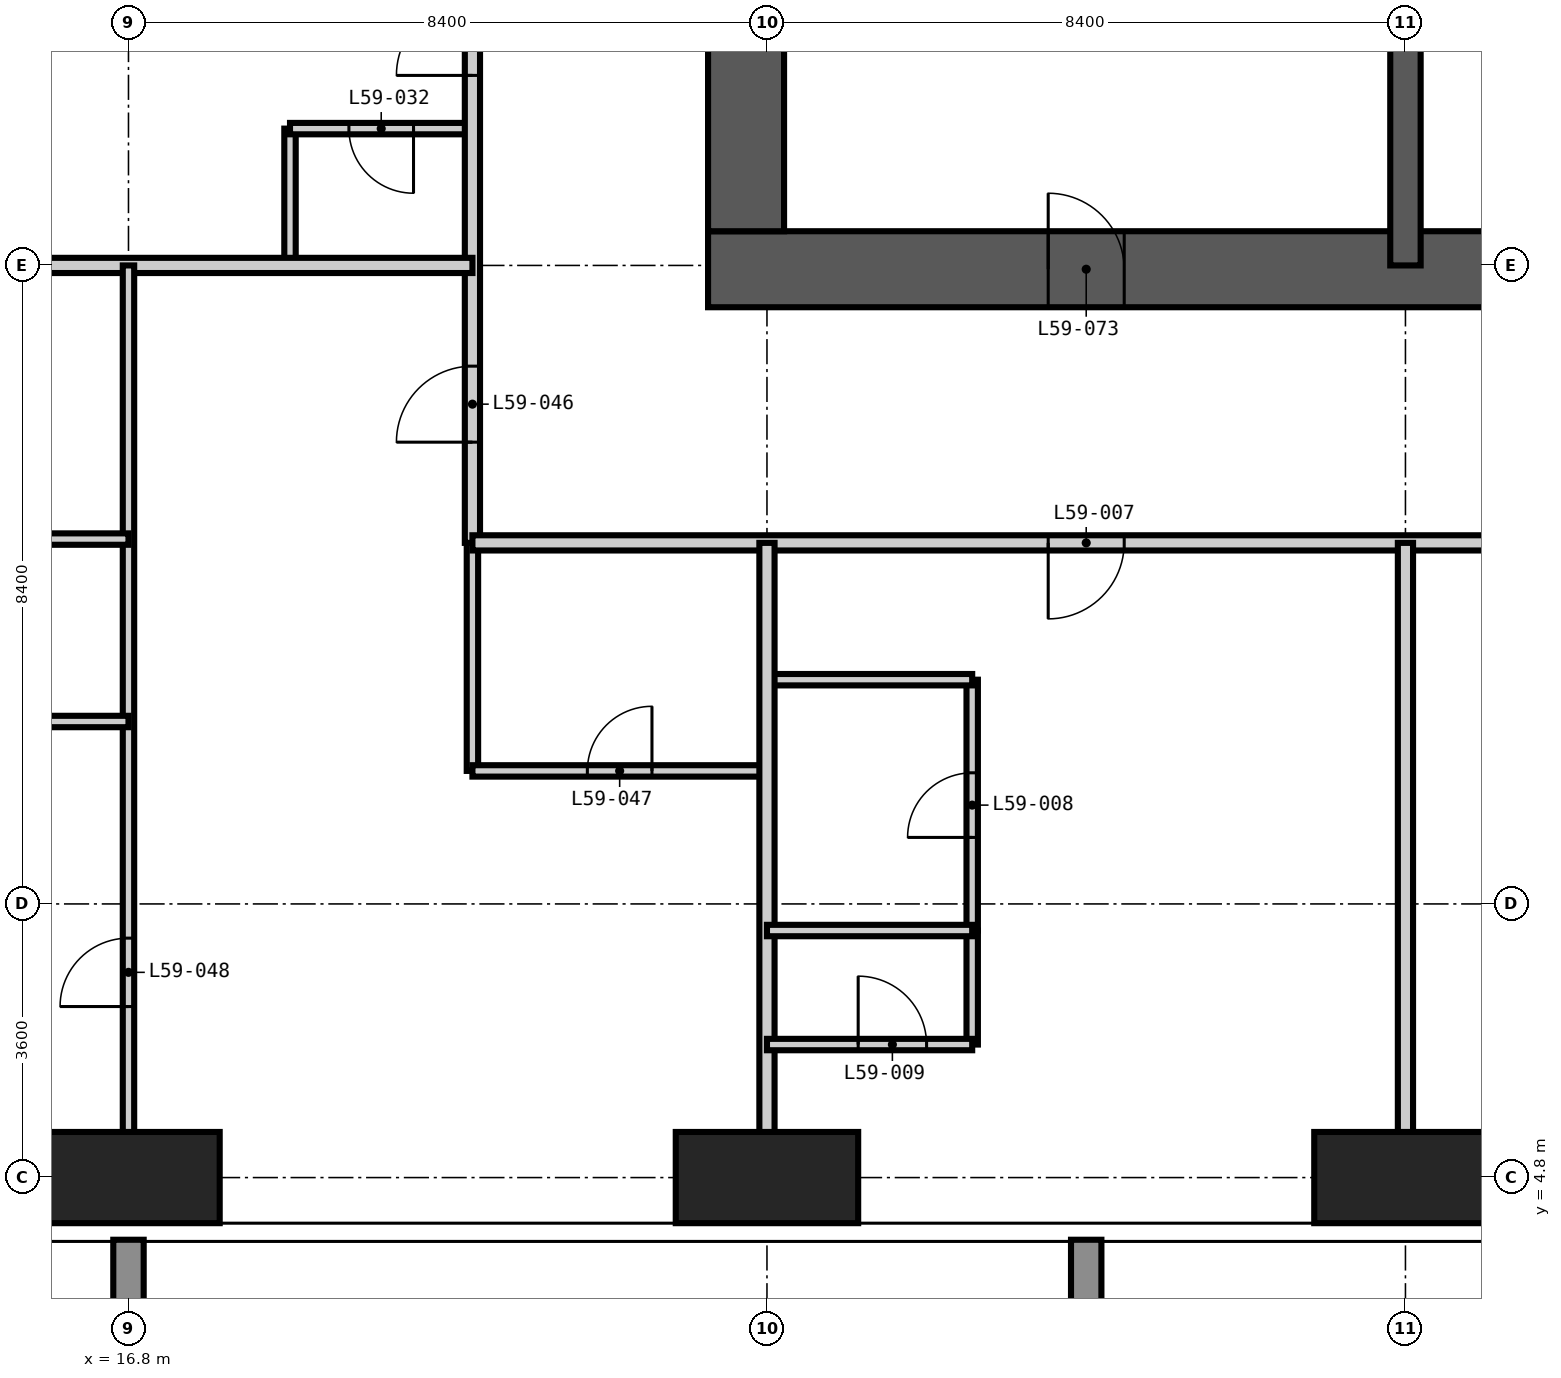
"""IFC4 building model, lengths in metres.
Left out: names, types, materials, properties, quantities, classifications, styles, units other than length and angle.
Written with IfcOpenShell. Run it as: python <this file> out.ifc"""

import sys

from ifc_helpers import new_model, si_unit, direction, frame, frame_2d, origin, origin_2d, place, context, subcontext, project, spatial, rectangle, extrude, element, fill, save


model = new_model("IFC4")
c1 = context("Model", 3, precision=1e-05, world=origin(), true_north=direction((0.0, 1.0)))
c2 = subcontext(c1, "Body", "Model", "MODEL_VIEW")
j1 = project(units=[si_unit("LENGTHUNIT", "METRE"), si_unit("PLANEANGLEUNIT", "RADIAN")], contexts=[c1])
p1 = place(None, origin())
s1 = spatial("IfcSite", under=j1, at=p1, CompositionType="ELEMENT")
p2 = place(p1, origin())
s2 = spatial("IfcBuilding", under=s1, at=p2, CompositionType="ELEMENT")
p3 = place(p2, frame((0.0, 0.0, 229.5)))
s3 = spatial("IfcBuildingStorey", under=s2, at=p3, CompositionType="ELEMENT", Elevation=229.5)
for number, where, z_axis, x_axis in (
    (1, (16.8, 4.8, -0.35), (0.0, 0.0, 1.0), (1.0, 0.0, 0.0)),
    (2, (25.2, 4.8, -0.35), (0.0, 0.0, 1.0), (1.0, 0.0, 0.0)),
    (3, (33.6, 4.8, -0.35), (0.0, 0.0, 1.0), (1.0, 0.0, 0.0)),
):
    element("IfcColumn", number, at=place(p3, frame(where, z_axis=z_axis, x_axis=x_axis)), inside=s3, PredefinedType="COLUMN", context=c2, shape_type="SweptSolid", body=[
        extrude(rectangle(XDim=2.4, YDim=1.2, at=origin_2d()), origin(), (0.0, 0.0, 1.0), 3.9),
    ])
p4 = place(p3, frame((24.425, 16.75, -0.35), z_axis=(0.0, 0.0, 1.0), x_axis=(1.0, 0.0, 0.0)))
e4 = element("IfcWall", 4, at=p4, inside=s3, PredefinedType="SHEAR", context=c2, shape_type="SweptSolid", body=[
    extrude(rectangle(XDim=18.125, YDim=1.0, at=frame_2d((9.062, 0.0))), origin(), (0.0, 0.0, 1.0), 3.9),
])
p5 = place(p4, frame((4.475, 0.0, 0.35)))
e5 = element("IfcOpeningElement", 5, at=p5, cuts=e4, PredefinedType="OPENING", context=c2, shape_type="SweptSolid", body=[
    extrude(rectangle(XDim=1.0, YDim=2.1, at=frame_2d((0.5, 1.05))), frame((0.0, 0.51, 0.0), z_axis=(0.0, -1.0, 0.0), x_axis=(1.0, 0.0, 0.0)), (0.0, 0.0, 1.0), 1.02),
])
p6 = place(p4, frame((10.775, 0.0, 0.35)))
e6 = element("IfcOpeningElement", 6, at=p6, cuts=e4, PredefinedType="OPENING", context=c2, shape_type="SweptSolid", body=[
    extrude(rectangle(XDim=1.0, YDim=2.1, at=frame_2d((0.5, 1.05))), frame((0.0, 0.51, 0.0), z_axis=(0.0, -1.0, 0.0), x_axis=(1.0, 0.0, 0.0)), (0.0, 0.0, 1.0), 1.02),
])
p7 = place(p3, frame((24.925, 41.55, -0.35), z_axis=(0.0, 0.0, 1.0), x_axis=(0.0, -1.0, 0.0)))
e7 = element("IfcWall", 7, at=p7, inside=s3, PredefinedType="SHEAR", context=c2, shape_type="SweptSolid", body=[
    extrude(rectangle(XDim=24.3, YDim=1.0, at=frame_2d((12.15, 0.0))), origin(), (0.0, 0.0, 1.0), 3.9),
])
p8 = place(p7, frame((11.65, 0.0, 0.35)))
e8 = element("IfcOpeningElement", 8, at=p8, cuts=e7, PredefinedType="OPENING", context=c2, shape_type="SweptSolid", body=[
    extrude(rectangle(XDim=1.0, YDim=2.1, at=frame_2d((0.5, 1.05))), frame((0.0, 0.51, 0.0), z_axis=(0.0, -1.0, 0.0), x_axis=(1.0, 0.0, 0.0)), (0.0, 0.0, 1.0), 1.02),
])
p9 = place(p3, frame((33.6, 16.8, -0.35), z_axis=(0.0, 0.0, 1.0), x_axis=(0.0, 1.0, 0.0)))
e9 = element("IfcWall", 9, at=p9, inside=s3, PredefinedType="SHEAR", context=c2, shape_type="SweptSolid", body=[
    extrude(rectangle(XDim=25.2, YDim=0.4, at=frame_2d((12.6, 0.0))), origin(), (0.0, 0.0, 1.0), 3.9),
])
p10 = place(p9, frame((22.5, 0.0, 0.35)))
e10 = element("IfcOpeningElement", 10, at=p10, cuts=e9, PredefinedType="OPENING", context=c2, shape_type="SweptSolid", body=[
    extrude(rectangle(XDim=1.2, YDim=2.2, at=frame_2d((0.6, 1.1))), frame((0.0, 0.21, 0.0), z_axis=(0.0, -1.0, 0.0), x_axis=(1.0, 0.0, 0.0)), (0.0, 0.0, 1.0), 0.42),
])
p11 = place(p9, frame((18.3, 0.0, 0.35)))
e11 = element("IfcOpeningElement", 11, at=p11, cuts=e9, PredefinedType="OPENING", context=c2, shape_type="SweptSolid", body=[
    extrude(rectangle(XDim=1.2, YDim=2.2, at=frame_2d((0.6, 1.1))), frame((0.0, 0.21, 0.0), z_axis=(0.0, -1.0, 0.0), x_axis=(1.0, 0.0, 0.0)), (0.0, 0.0, 1.0), 0.42),
])
p12 = place(p9, frame((9.3, 0.0, 0.35)))
e12 = element("IfcOpeningElement", 12, at=p12, cuts=e9, PredefinedType="OPENING", context=c2, shape_type="SweptSolid", body=[
    extrude(rectangle(XDim=1.0, YDim=2.1, at=frame_2d((0.5, 1.05))), frame((0.0, 0.21, 0.0), z_axis=(0.0, -1.0, 0.0), x_axis=(1.0, 0.0, 0.0)), (0.0, 0.0, 1.0), 0.42),
])
p13 = place(p3, frame((18.925, 16.8, 0.0), z_axis=(0.0, 0.0, 1.0), x_axis=(0.0, 1.0, 0.0)))
e13 = element("IfcWall", 13, at=p13, inside=s3, PredefinedType="PARTITIONING", context=c2, shape_type="SweptSolid", body=[
    extrude(rectangle(XDim=1.8, YDim=0.15, at=frame_2d((0.9, 0.0))), origin(), (0.0, 0.0, 1.0), 3.55),
])
p14 = place(p3, frame((21.325, 10.15, 0.0), z_axis=(0.0, 0.0, 1.0), x_axis=(0.0, 1.0, 0.0)))
e14 = element("IfcWall", 14, at=p14, inside=s3, PredefinedType="PARTITIONING", context=c2, shape_type="SweptSolid", body=[
    extrude(rectangle(XDim=3.0, YDim=0.15, at=frame_2d((1.5, 0.0))), origin(), (0.0, 0.0, 1.0), 3.55),
])
p15 = place(p3, frame((27.9, 8.05, 0.0), z_axis=(0.0, 0.0, 1.0), x_axis=(0.0, 1.0, 0.0)))
e15 = element("IfcWall", 15, at=p15, inside=s3, PredefinedType="PARTITIONING", context=c2, shape_type="SweptSolid", body=[
    extrude(rectangle(XDim=3.3, YDim=0.15, at=frame_2d((1.65, 0.0))), origin(), (0.0, 0.0, 1.0), 3.55),
])
p16 = place(p15, frame((1.225, 0.0, 0.0)))
e16 = element("IfcOpeningElement", 16, at=p16, cuts=e15, PredefinedType="OPENING", context=c2, shape_type="SweptSolid", body=[
    extrude(rectangle(XDim=0.85, YDim=2.1, at=frame_2d((0.425, 1.05))), frame((0.0, 0.085, 0.0), z_axis=(0.0, -1.0, 0.0), x_axis=(1.0, 0.0, 0.0)), (0.0, 0.0, 1.0), 0.17),
])
p17 = place(p3, frame((21.325, 10.15, 0.0), z_axis=(0.0, 0.0, 1.0), x_axis=(1.0, 0.0, 0.0)))
e17 = element("IfcWall", 17, at=p17, inside=s3, PredefinedType="PARTITIONING", context=c2, shape_type="SweptSolid", body=[
    extrude(rectangle(XDim=3.875, YDim=0.15, at=frame_2d((1.938, 0.0))), origin(), (0.0, 0.0, 1.0), 3.55),
])
p18 = place(p17, frame((1.512, 0.0, 0.0)))
e18 = element("IfcOpeningElement", 18, at=p18, cuts=e17, PredefinedType="OPENING", context=c2, shape_type="SweptSolid", body=[
    extrude(rectangle(XDim=0.85, YDim=2.1, at=frame_2d((0.425, 1.05))), frame((0.0, 0.085, 0.0), z_axis=(0.0, -1.0, 0.0), x_axis=(1.0, 0.0, 0.0)), (0.0, 0.0, 1.0), 0.17),
])
p19 = place(p3, frame((25.2, 11.35, 0.0), z_axis=(0.0, 0.0, 1.0), x_axis=(1.0, 0.0, 0.0)))
e19 = element("IfcWall", 19, at=p19, inside=s3, PredefinedType="PARTITIONING", context=c2, shape_type="SweptSolid", body=[
    extrude(rectangle(XDim=2.7, YDim=0.15, at=frame_2d((1.35, 0.0))), origin(), (0.0, 0.0, 1.0), 3.55),
])
p20 = place(p3, frame((18.925, 18.6, 0.0), z_axis=(0.0, 0.0, 1.0), x_axis=(1.0, 0.0, 0.0)))
e20 = element("IfcWall", 20, at=p20, inside=s3, PredefinedType="PARTITIONING", context=c2, shape_type="SweptSolid", body=[
    extrude(rectangle(XDim=2.4, YDim=0.15, at=frame_2d((1.2, 0.0))), origin(), (0.0, 0.0, 1.0), 3.55),
])
p21 = place(p20, frame((0.775, 0.0, 0.0)))
e21 = element("IfcOpeningElement", 21, at=p21, cuts=e20, PredefinedType="OPENING", context=c2, shape_type="SweptSolid", body=[
    extrude(rectangle(XDim=0.85, YDim=2.1, at=frame_2d((0.425, 1.05))), frame((0.0, 0.085, 0.0), z_axis=(0.0, -1.0, 0.0), x_axis=(1.0, 0.0, 0.0)), (0.0, 0.0, 1.0), 0.17),
])
p22 = place(p3, frame((21.325, 13.15, 0.0), z_axis=(0.0, 0.0, 1.0), x_axis=(0.0, 1.0, 0.0)))
e22 = element("IfcWall", 22, at=p22, inside=s3, PredefinedType="PARTITIONING", context=c2, shape_type="SweptSolid", body=[
    extrude(rectangle(XDim=31.9, YDim=0.2, at=frame_2d((15.95, 0.0))), origin(), (0.0, 0.0, 1.0), 3.55),
])
p23 = place(p22, frame((6.15, 0.0, 0.0)))
e23 = element("IfcOpeningElement", 23, at=p23, cuts=e22, PredefinedType="OPENING", context=c2, shape_type="SweptSolid", body=[
    extrude(rectangle(XDim=1.0, YDim=2.2, at=frame_2d((0.5, 1.1))), frame((0.0, 0.11, 0.0), z_axis=(0.0, -1.0, 0.0), x_axis=(1.0, 0.0, 0.0)), (0.0, 0.0, 1.0), 0.22),
])
p24 = place(p22, frame((16.95, 0.0, 0.0)))
e24 = element("IfcOpeningElement", 24, at=p24, cuts=e22, PredefinedType="OPENING", context=c2, shape_type="SweptSolid", body=[
    extrude(rectangle(XDim=1.0, YDim=2.2, at=frame_2d((0.5, 1.1))), frame((0.0, 0.11, 0.0), z_axis=(0.0, -1.0, 0.0), x_axis=(1.0, 0.0, 0.0)), (0.0, 0.0, 1.0), 0.22),
])
p25 = place(p22, frame((22.95, 0.0, 0.0)))
e25 = element("IfcOpeningElement", 25, at=p25, cuts=e22, PredefinedType="OPENING", context=c2, shape_type="SweptSolid", body=[
    extrude(rectangle(XDim=1.0, YDim=2.2, at=frame_2d((0.5, 1.1))), frame((0.0, 0.11, 0.0), z_axis=(0.0, -1.0, 0.0), x_axis=(1.0, 0.0, 0.0)), (0.0, 0.0, 1.0), 0.22),
])
p26 = place(p22, frame((1.325, 0.0, 0.0)))
e26 = element("IfcOpeningElement", 26, at=p26, cuts=e22, PredefinedType="OPENING", context=c2, shape_type="SweptSolid", body=[
    extrude(rectangle(XDim=1.0, YDim=2.2, at=frame_2d((0.5, 1.1))), frame((0.0, 0.11, 0.0), z_axis=(0.0, -1.0, 0.0), x_axis=(1.0, 0.0, 0.0)), (0.0, 0.0, 1.0), 0.22),
])
p27 = place(p22, frame((29.875, 0.0, 0.0)))
e27 = element("IfcOpeningElement", 27, at=p27, cuts=e22, PredefinedType="OPENING", context=c2, shape_type="SweptSolid", body=[
    extrude(rectangle(XDim=1.0, YDim=2.2, at=frame_2d((0.5, 1.1))), frame((0.0, 0.11, 0.0), z_axis=(0.0, -1.0, 0.0), x_axis=(1.0, 0.0, 0.0)), (0.0, 0.0, 1.0), 0.22),
])
p28 = place(p3, frame((44.45, 13.15, 0.0), z_axis=(0.0, 0.0, 1.0), x_axis=(-1.0, 0.0, 0.0)))
e28 = element("IfcWall", 28, at=p28, inside=s3, PredefinedType="PARTITIONING", context=c2, shape_type="SweptSolid", body=[
    extrude(rectangle(XDim=23.125, YDim=0.2, at=frame_2d((11.562, 0.0))), origin(), (0.0, 0.0, 1.0), 3.55),
])
p29 = place(p28, frame((14.55, 0.0, 0.0)))
e29 = element("IfcOpeningElement", 29, at=p29, cuts=e28, PredefinedType="OPENING", context=c2, shape_type="SweptSolid", body=[
    extrude(rectangle(XDim=1.0, YDim=2.2, at=frame_2d((0.5, 1.1))), frame((0.0, 0.11, 0.0), z_axis=(0.0, -1.0, 0.0), x_axis=(1.0, 0.0, 0.0)), (0.0, 0.0, 1.0), 0.22),
])
p30 = place(p28, frame((6.15, 0.0, 0.0)))
e30 = element("IfcOpeningElement", 30, at=p30, cuts=e28, PredefinedType="OPENING", context=c2, shape_type="SweptSolid", body=[
    extrude(rectangle(XDim=1.0, YDim=2.2, at=frame_2d((0.5, 1.1))), frame((0.0, 0.11, 0.0), z_axis=(0.0, -1.0, 0.0), x_axis=(1.0, 0.0, 0.0)), (0.0, 0.0, 1.0), 0.22),
])
for number, where, z_axis, x_axis in (
    (31, (25.2, 4.182, 0.0), (0.0, 0.0, 1.0), (0.0, 1.0, 0.0)),
    (32, (33.6, 4.182, 0.0), (0.0, 0.0, 1.0), (0.0, 1.0, 0.0)),
):
    element("IfcWall", number, at=place(p3, frame(where, z_axis=z_axis, x_axis=x_axis)), inside=s3, PredefinedType="PARTITIONING", context=c2, shape_type="SweptSolid", body=[
        extrude(rectangle(XDim=8.968, YDim=0.2, at=frame_2d((4.484, 0.0))), origin(), (0.0, 0.0, 1.0), 3.55),
    ])
p31 = place(p3, frame((12.582, 16.8, 0.0), z_axis=(0.0, 0.0, 1.0), x_axis=(1.0, 0.0, 0.0)))
e33 = element("IfcWall", 33, at=p31, inside=s3, PredefinedType="PARTITIONING", context=c2, shape_type="SweptSolid", body=[
    extrude(rectangle(XDim=8.743, YDim=0.2, at=frame_2d((4.372, 0.0))), origin(), (0.0, 0.0, 1.0), 3.55),
])
p32 = place(p3, frame((16.8, 4.182, 0.0), z_axis=(0.0, 0.0, 1.0), x_axis=(0.0, 1.0, 0.0)))
e34 = element("IfcWall", 34, at=p32, inside=s3, PredefinedType="PARTITIONING", context=c2, shape_type="SweptSolid", body=[
    extrude(rectangle(XDim=12.618, YDim=0.15, at=frame_2d((6.309, 0.0))), origin(), (0.0, 0.0, 1.0), 3.55),
])
p33 = place(p32, frame((2.868, 0.0, 0.0)))
e35 = element("IfcOpeningElement", 35, at=p33, cuts=e34, PredefinedType="OPENING", context=c2, shape_type="SweptSolid", body=[
    extrude(rectangle(XDim=0.9, YDim=2.1, at=frame_2d((0.45, 1.05))), frame((0.0, 0.085, 0.0), z_axis=(0.0, -1.0, 0.0), x_axis=(1.0, 0.0, 0.0)), (0.0, 0.0, 1.0), 0.17),
])
p34 = place(p3, frame((27.9, 6.55, 0.0), z_axis=(0.0, 0.0, 1.0), x_axis=(0.0, 1.0, 0.0)))
e36 = element("IfcWall", 36, at=p34, inside=s3, PredefinedType="PARTITIONING", context=c2, shape_type="SweptSolid", body=[
    extrude(rectangle(XDim=1.5, YDim=0.15, at=frame_2d((0.75, 0.0))), origin(), (0.0, 0.0, 1.0), 3.55),
])
p35 = place(p3, frame((25.2, 6.55, 0.0), z_axis=(0.0, 0.0, 1.0), x_axis=(1.0, 0.0, 0.0)))
e37 = element("IfcWall", 37, at=p35, inside=s3, PredefinedType="PARTITIONING", context=c2, shape_type="SweptSolid", body=[
    extrude(rectangle(XDim=2.7, YDim=0.15, at=frame_2d((1.35, 0.0))), origin(), (0.0, 0.0, 1.0), 3.55),
])
p36 = place(p35, frame((1.2, 0.0, 0.0)))
e38 = element("IfcOpeningElement", 38, at=p36, cuts=e37, PredefinedType="OPENING", context=c2, shape_type="SweptSolid", body=[
    extrude(rectangle(XDim=0.9, YDim=2.1, at=frame_2d((0.45, 1.05))), frame((0.0, 0.085, 0.0), z_axis=(0.0, -1.0, 0.0), x_axis=(1.0, 0.0, 0.0)), (0.0, 0.0, 1.0), 0.17),
])
p37 = place(p3, frame((25.2, 8.05, 0.0), z_axis=(0.0, 0.0, 1.0), x_axis=(1.0, 0.0, 0.0)))
e39 = element("IfcWall", 39, at=p37, inside=s3, PredefinedType="PARTITIONING", context=c2, shape_type="SweptSolid", body=[
    extrude(rectangle(XDim=2.7, YDim=0.15, at=frame_2d((1.35, 0.0))), origin(), (0.0, 0.0, 1.0), 3.55),
])
p38 = place(p3, frame((13.8, 10.8, 0.0), z_axis=(0.0, 0.0, 1.0), x_axis=(1.0, 0.0, 0.0)))
e40 = element("IfcWall", 40, at=p38, inside=s3, PredefinedType="PARTITIONING", context=c2, shape_type="SweptSolid", body=[
    extrude(rectangle(XDim=3.0, YDim=0.15, at=frame_2d((1.5, 0.0))), origin(), (0.0, 0.0, 1.0), 3.55),
])
p39 = place(p38, frame((1.05, 0.0, 0.0)))
e41 = element("IfcOpeningElement", 41, at=p39, cuts=e40, PredefinedType="OPENING", context=c2, shape_type="SweptSolid", body=[
    extrude(rectangle(XDim=0.9, YDim=2.1, at=frame_2d((0.45, 1.05))), frame((0.0, 0.085, 0.0), z_axis=(0.0, -1.0, 0.0), x_axis=(1.0, 0.0, 0.0)), (0.0, 0.0, 1.0), 0.17),
])
p40 = place(p3, frame((13.8, 13.2, 0.0), z_axis=(0.0, 0.0, 1.0), x_axis=(1.0, 0.0, 0.0)))
e42 = element("IfcWall", 42, at=p40, inside=s3, PredefinedType="PARTITIONING", context=c2, shape_type="SweptSolid", body=[
    extrude(rectangle(XDim=3.0, YDim=0.15, at=frame_2d((1.5, 0.0))), origin(), (0.0, 0.0, 1.0), 3.55),
])
p41 = place(p29, origin())
e43 = element("IfcDoor", 43, at=p41, inside=s3, OperationType="SINGLE_SWING_RIGHT", PredefinedType="DOOR", context=c2, shape_type="SweptSolid", body=[
    extrude(rectangle(XDim=1.0, YDim=2.2, at=frame_2d((0.5, 1.1))), frame((0.0, 0.025, 0.0), z_axis=(0.0, -1.0, 0.0), x_axis=(1.0, 0.0, 0.0)), (0.0, 0.0, 1.0), 0.05),
])
fill(e29, e43)
p42 = place(p16, origin())
e44 = element("IfcDoor", 44, at=p42, inside=s3, OperationType="SINGLE_SWING_LEFT", PredefinedType="DOOR", context=c2, shape_type="SweptSolid", body=[
    extrude(rectangle(XDim=0.85, YDim=2.1, at=frame_2d((0.425, 1.05))), frame((0.0, 0.025, 0.0), z_axis=(0.0, -1.0, 0.0), x_axis=(1.0, 0.0, 0.0)), (0.0, 0.0, 1.0), 0.05),
])
fill(e16, e44)
p43 = place(p36, origin())
e45 = element("IfcDoor", 45, at=p43, inside=s3, OperationType="SINGLE_SWING_LEFT", PredefinedType="DOOR", context=c2, shape_type="SweptSolid", body=[
    extrude(rectangle(XDim=0.9, YDim=2.1, at=frame_2d((0.45, 1.05))), frame((0.0, 0.025, 0.0), z_axis=(0.0, -1.0, 0.0), x_axis=(1.0, 0.0, 0.0)), (0.0, 0.0, 1.0), 0.05),
])
fill(e38, e45)
p44 = place(p23, origin())
e46 = element("IfcDoor", 46, at=p44, inside=s3, OperationType="SINGLE_SWING_LEFT", PredefinedType="DOOR", context=c2, shape_type="SweptSolid", body=[
    extrude(rectangle(XDim=1.0, YDim=2.2, at=frame_2d((0.5, 1.1))), frame((0.0, 0.025, 0.0), z_axis=(0.0, -1.0, 0.0), x_axis=(1.0, 0.0, 0.0)), (0.0, 0.0, 1.0), 0.05),
])
fill(e23, e46)
p45 = place(p21, frame((0.85, 0.0, 0.0), z_axis=(0.0, 0.0, 1.0), x_axis=(-1.0, 0.0, 0.0)))
e47 = element("IfcDoor", 47, at=p45, inside=s3, OperationType="SINGLE_SWING_LEFT", PredefinedType="DOOR", context=c2, shape_type="SweptSolid", body=[
    extrude(rectangle(XDim=0.85, YDim=2.1, at=frame_2d((0.425, 1.05))), frame((0.0, 0.025, 0.0), z_axis=(0.0, -1.0, 0.0), x_axis=(1.0, 0.0, 0.0)), (0.0, 0.0, 1.0), 0.05),
])
fill(e21, e47)
p46 = place(p26, origin())
e48 = element("IfcDoor", 48, at=p46, inside=s3, OperationType="SINGLE_SWING_LEFT", PredefinedType="DOOR", context=c2, shape_type="SweptSolid", body=[
    extrude(rectangle(XDim=1.0, YDim=2.2, at=frame_2d((0.5, 1.1))), frame((0.0, 0.025, 0.0), z_axis=(0.0, -1.0, 0.0), x_axis=(1.0, 0.0, 0.0)), (0.0, 0.0, 1.0), 0.05),
])
fill(e26, e48)
p47 = place(p18, origin())
e49 = element("IfcDoor", 49, at=p47, inside=s3, OperationType="SINGLE_SWING_RIGHT", PredefinedType="DOOR", context=c2, shape_type="SweptSolid", body=[
    extrude(rectangle(XDim=0.85, YDim=2.1, at=frame_2d((0.425, 1.05))), frame((0.0, 0.025, 0.0), z_axis=(0.0, -1.0, 0.0), x_axis=(1.0, 0.0, 0.0)), (0.0, 0.0, 1.0), 0.05),
])
fill(e18, e49)
p48 = place(p33, origin())
e50 = element("IfcDoor", 50, at=p48, inside=s3, OperationType="SINGLE_SWING_LEFT", PredefinedType="DOOR", context=c2, shape_type="SweptSolid", body=[
    extrude(rectangle(XDim=0.9, YDim=2.1, at=frame_2d((0.45, 1.05))), frame((0.0, 0.025, 0.0), z_axis=(0.0, -1.0, 0.0), x_axis=(1.0, 0.0, 0.0)), (0.0, 0.0, 1.0), 0.05),
])
fill(e35, e50)
p49 = place(p5, origin())
e51 = element("IfcDoor", 51, at=p49, inside=s3, OperationType="SINGLE_SWING_LEFT", PredefinedType="DOOR", context=c2, shape_type="SweptSolid", body=[
    extrude(rectangle(XDim=1.0, YDim=2.1, at=frame_2d((0.5, 1.05))), frame((0.0, 0.025, 0.0), z_axis=(0.0, -1.0, 0.0), x_axis=(1.0, 0.0, 0.0)), (0.0, 0.0, 1.0), 0.05),
])
fill(e5, e51)
save(model, sys.argv[1])
